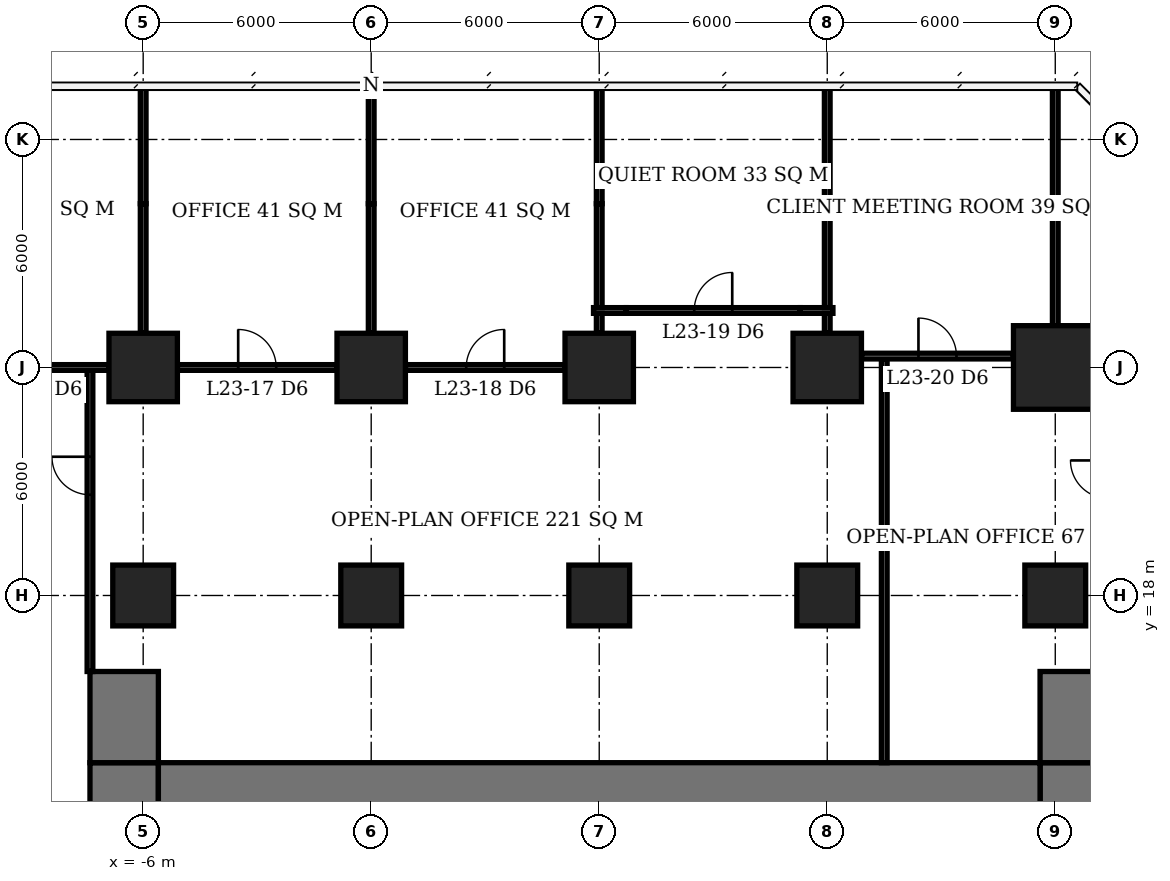
"""IFC4 building model, lengths in metres.
Left out: names, types, materials, properties, quantities, classifications, styles, units other than length and angle.
Written with IfcOpenShell. Run it as: python <this file> out.ifc"""

import sys

from ifc_helpers import new_model, si_unit, direction, frame, frame_2d, origin, origin_2d, place, context, subcontext, project, spatial, rectangle, extrude, element, fill, save


model = new_model("IFC4")
c1 = context("Model", 3, precision=1e-05, world=origin(), true_north=direction((0.0, 1.0)))
c2 = subcontext(c1, "Body", "Model", "MODEL_VIEW")
j1 = project(units=[si_unit("LENGTHUNIT", "METRE"), si_unit("PLANEANGLEUNIT", "RADIAN")], contexts=[c1])
p1 = place(None, origin())
s1 = spatial("IfcSite", under=j1, at=p1, CompositionType="ELEMENT")
p2 = place(p1, origin())
s2 = spatial("IfcBuilding", under=s1, at=p2, CompositionType="ELEMENT")
p3 = place(p2, frame((0.0, 0.0, 97.7)))
s3 = spatial("IfcBuildingStorey", under=s2, at=p3, CompositionType="ELEMENT", Elevation=97.7)
p4 = place(p3, frame((-6.0, 18.0, 0.0), z_axis=(0.0, 0.0, 1.0), x_axis=(1.0, 0.0, 0.0)))
e1 = element("IfcColumn", 1, at=p4, inside=s3, PredefinedType="COLUMN", context=c2, shape_type="SweptSolid", body=[
    extrude(rectangle(XDim=1.6, YDim=1.6, at=origin_2d()), origin(), (0.0, 0.0, 1.0), 3.9),
])
p5 = place(p3, frame((-6.0, 24.0, 0.0), z_axis=(0.0, 0.0, 1.0), x_axis=(1.0, 0.0, 0.0)))
e2 = element("IfcColumn", 2, at=p5, inside=s3, PredefinedType="COLUMN", context=c2, shape_type="SweptSolid", body=[
    extrude(rectangle(XDim=1.8, YDim=1.8, at=origin_2d()), origin(), (0.0, 0.0, 1.0), 3.9),
])
p6 = place(p3, frame((0.0, 18.0, 0.0), z_axis=(0.0, 0.0, 1.0), x_axis=(1.0, 0.0, 0.0)))
e3 = element("IfcColumn", 3, at=p6, inside=s3, PredefinedType="COLUMN", context=c2, shape_type="SweptSolid", body=[
    extrude(rectangle(XDim=1.6, YDim=1.6, at=origin_2d()), origin(), (0.0, 0.0, 1.0), 3.9),
])
p7 = place(p3, frame((0.0, 24.0, 0.0), z_axis=(0.0, 0.0, 1.0), x_axis=(1.0, 0.0, 0.0)))
e4 = element("IfcColumn", 4, at=p7, inside=s3, PredefinedType="COLUMN", context=c2, shape_type="SweptSolid", body=[
    extrude(rectangle(XDim=1.8, YDim=1.8, at=origin_2d()), origin(), (0.0, 0.0, 1.0), 3.9),
])
p8 = place(p3, frame((6.0, 18.0, 0.0), z_axis=(0.0, 0.0, 1.0), x_axis=(1.0, 0.0, 0.0)))
e5 = element("IfcColumn", 5, at=p8, inside=s3, PredefinedType="COLUMN", context=c2, shape_type="SweptSolid", body=[
    extrude(rectangle(XDim=1.6, YDim=1.6, at=origin_2d()), origin(), (0.0, 0.0, 1.0), 3.9),
])
p9 = place(p3, frame((6.0, 24.0, 0.0), z_axis=(0.0, 0.0, 1.0), x_axis=(1.0, 0.0, 0.0)))
e6 = element("IfcColumn", 6, at=p9, inside=s3, PredefinedType="COLUMN", context=c2, shape_type="SweptSolid", body=[
    extrude(rectangle(XDim=1.8, YDim=1.8, at=origin_2d()), origin(), (0.0, 0.0, 1.0), 3.9),
])
p10 = place(p3, frame((12.0, 18.0, 0.0), z_axis=(0.0, 0.0, 1.0), x_axis=(1.0, 0.0, 0.0)))
e7 = element("IfcColumn", 7, at=p10, inside=s3, PredefinedType="COLUMN", context=c2, shape_type="SweptSolid", body=[
    extrude(rectangle(XDim=1.6, YDim=1.6, at=origin_2d()), origin(), (0.0, 0.0, 1.0), 3.9),
])
p11 = place(p3, frame((12.0, 24.0, 0.0), z_axis=(0.0, 0.0, 1.0), x_axis=(1.0, 0.0, 0.0)))
e8 = element("IfcColumn", 8, at=p11, inside=s3, PredefinedType="COLUMN", context=c2, shape_type="SweptSolid", body=[
    extrude(rectangle(XDim=1.8, YDim=1.8, at=origin_2d()), origin(), (0.0, 0.0, 1.0), 3.9),
])
p12 = place(p3, frame((18.0, 18.0, 0.0), z_axis=(0.0, 0.0, 1.0), x_axis=(1.0, 0.0, 0.0)))
e9 = element("IfcColumn", 9, at=p12, inside=s3, PredefinedType="COLUMN", context=c2, shape_type="SweptSolid", body=[
    extrude(rectangle(XDim=1.6, YDim=1.6, at=origin_2d()), origin(), (0.0, 0.0, 1.0), 3.9),
])
p13 = place(p3, frame((18.0, 24.0, 0.0), z_axis=(0.0, 0.0, 1.0), x_axis=(1.0, 0.0, 0.0)))
e10 = element("IfcColumn", 10, at=p13, inside=s3, PredefinedType="COLUMN", context=c2, shape_type="SweptSolid", body=[
    extrude(rectangle(XDim=2.2, YDim=2.2, at=origin_2d()), origin(), (0.0, 0.0, 1.0), 3.9),
])
p14 = place(p3, frame((-5.6, 12.6, 0.0), z_axis=(0.0, 0.0, 1.0), x_axis=(1.0, 0.0, 0.0)))
e11 = element("IfcWall", 11, at=p14, inside=s3, PredefinedType="SHEAR", context=c2, shape_type="SweptSolid", body=[
    extrude(rectangle(XDim=23.2, YDim=2.0, at=frame_2d((11.6, 0.0))), origin(), (0.0, 0.0, 1.0), 3.9),
])
p15 = place(p3, frame((-6.5, -7.6, 0.0), z_axis=(0.0, 0.0, 1.0), x_axis=(0.0, 1.0, 0.0)))
e12 = element("IfcWall", 12, at=p15, inside=s3, PredefinedType="SHEAR", context=c2, shape_type="SweptSolid", body=[
    extrude(rectangle(XDim=21.2, YDim=1.8, at=frame_2d((10.6, 0.0))), origin(), (0.0, 0.0, 1.0), 3.9),
])
p16 = place(p15, frame((7.8, 0.0, 0.0)))
e13 = element("IfcOpeningElement", 13, at=p16, cuts=e12, PredefinedType="OPENING", context=c2, shape_type="SweptSolid", body=[
    extrude(rectangle(XDim=1.8, YDim=2.4, at=frame_2d((0.9, 1.2))), frame((0.0, 0.91, 0.0), z_axis=(0.0, -1.0, 0.0), x_axis=(1.0, 0.0, 0.0)), (0.0, 0.0, 1.0), 1.82),
])
p17 = place(p3, frame((18.5, -7.6, 0.0), z_axis=(0.0, 0.0, 1.0), x_axis=(0.0, 1.0, 0.0)))
e14 = element("IfcWall", 14, at=p17, inside=s3, PredefinedType="SHEAR", context=c2, shape_type="SweptSolid", body=[
    extrude(rectangle(XDim=21.2, YDim=1.8, at=frame_2d((10.6, 0.0))), origin(), (0.0, 0.0, 1.0), 3.9),
])
p18 = place(p17, frame((9.2, 0.0, 0.0)))
e15 = element("IfcOpeningElement", 15, at=p18, cuts=e14, PredefinedType="OPENING", context=c2, shape_type="SweptSolid", body=[
    extrude(rectangle(XDim=1.8, YDim=2.4, at=frame_2d((0.9, 1.2))), frame((0.0, 0.91, 0.0), z_axis=(0.0, -1.0, 0.0), x_axis=(1.0, 0.0, 0.0)), (0.0, 0.0, 1.0), 1.82),
])
for number, where, z_axis, x_axis in (
    (16, (-6.5, 13.6, 0.0), (0.0, 0.0, 1.0), (0.0, 1.0, 0.0)),
    (17, (18.5, 13.6, 0.0), (0.0, 0.0, 1.0), (0.0, 1.0, 0.0)),
):
    element("IfcWall", number, at=place(p3, frame(where, z_axis=z_axis, x_axis=x_axis)), inside=s3, PredefinedType="SHEAR", context=c2, shape_type="SweptSolid", body=[
        extrude(rectangle(XDim=2.4, YDim=1.8, at=frame_2d((1.2, 0.0))), origin(), (0.0, 0.0, 1.0), 3.9),
    ])
p19 = place(p3, frame((-11.0, 24.0, 0.0), z_axis=(0.0, 0.0, 1.0), x_axis=(1.0, 0.0, 0.0)))
e18 = element("IfcWall", 18, at=p19, inside=s3, PredefinedType="PARTITIONING", context=c2, shape_type="SweptSolid", body=[
    extrude(rectangle(XDim=4.1, YDim=0.15, at=frame_2d((2.05, 0.0))), origin(), (0.0, 0.0, 1.0), 3.65),
])
p20 = place(p19, frame((1.55, 0.0, 0.0)))
e19 = element("IfcOpeningElement", 19, at=p20, cuts=e18, PredefinedType="OPENING", context=c2, shape_type="SweptSolid", body=[
    extrude(rectangle(XDim=1.0, YDim=2.1, at=frame_2d((0.5, 1.05))), frame((0.0, 0.085, 0.0), z_axis=(0.0, -1.0, 0.0), x_axis=(1.0, 0.0, 0.0)), (0.0, 0.0, 1.0), 0.17),
])
p21 = place(p3, frame((-5.1, 24.0, 0.0), z_axis=(0.0, 0.0, 1.0), x_axis=(1.0, 0.0, 0.0)))
e20 = element("IfcWall", 20, at=p21, inside=s3, PredefinedType="PARTITIONING", context=c2, shape_type="SweptSolid", body=[
    extrude(rectangle(XDim=4.2, YDim=0.15, at=frame_2d((2.1, 0.0))), origin(), (0.0, 0.0, 1.0), 3.65),
])
p22 = place(p21, frame((1.6, 0.0, 0.0)))
e21 = element("IfcOpeningElement", 21, at=p22, cuts=e20, PredefinedType="OPENING", context=c2, shape_type="SweptSolid", body=[
    extrude(rectangle(XDim=1.0, YDim=2.1, at=frame_2d((0.5, 1.05))), frame((0.0, 0.085, 0.0), z_axis=(0.0, -1.0, 0.0), x_axis=(1.0, 0.0, 0.0)), (0.0, 0.0, 1.0), 0.17),
])
p23 = place(p3, frame((0.9, 24.0, 0.0), z_axis=(0.0, 0.0, 1.0), x_axis=(1.0, 0.0, 0.0)))
e22 = element("IfcWall", 22, at=p23, inside=s3, PredefinedType="PARTITIONING", context=c2, shape_type="SweptSolid", body=[
    extrude(rectangle(XDim=4.2, YDim=0.15, at=frame_2d((2.1, 0.0))), origin(), (0.0, 0.0, 1.0), 3.65),
])
p24 = place(p23, frame((1.6, 0.0, 0.0)))
e23 = element("IfcOpeningElement", 23, at=p24, cuts=e22, PredefinedType="OPENING", context=c2, shape_type="SweptSolid", body=[
    extrude(rectangle(XDim=1.0, YDim=2.1, at=frame_2d((0.5, 1.05))), frame((0.0, 0.085, 0.0), z_axis=(0.0, -1.0, 0.0), x_axis=(1.0, 0.0, 0.0)), (0.0, 0.0, 1.0), 0.17),
])
p25 = place(p3, frame((12.9, 24.3, 0.0), z_axis=(0.0, 0.0, 1.0), x_axis=(1.0, 0.0, 0.0)))
e24 = element("IfcWall", 24, at=p25, inside=s3, PredefinedType="PARTITIONING", context=c2, shape_type="SweptSolid", body=[
    extrude(rectangle(XDim=4.0, YDim=0.15, at=frame_2d((2.0, 0.0))), origin(), (0.0, 0.0, 1.0), 3.65),
])
p26 = place(p25, frame((1.5, 0.0, 0.0)))
e25 = element("IfcOpeningElement", 25, at=p26, cuts=e24, PredefinedType="OPENING", context=c2, shape_type="SweptSolid", body=[
    extrude(rectangle(XDim=1.0, YDim=2.1, at=frame_2d((0.5, 1.05))), frame((0.0, 0.085, 0.0), z_axis=(0.0, -1.0, 0.0), x_axis=(1.0, 0.0, 0.0)), (0.0, 0.0, 1.0), 0.17),
])
p27 = place(p3, frame((5.85, 25.5, 0.0), z_axis=(0.0, 0.0, 1.0), x_axis=(1.0, 0.0, 0.0)))
e26 = element("IfcWall", 26, at=p27, inside=s3, PredefinedType="PARTITIONING", context=c2, shape_type="SweptSolid", body=[
    extrude(rectangle(XDim=0.86, YDim=0.15, at=frame_2d((0.43, 0.0))), origin(), (0.0, 0.0, 1.0), 2.65),
])
p28 = place(p3, frame((6.71, 25.5, 0.0), z_axis=(0.0, 0.0, 1.0), x_axis=(1.0, 0.0, 0.0)))
e27 = element("IfcWall", 27, at=p28, inside=s3, PredefinedType="PARTITIONING", context=c2, shape_type="SweptSolid", body=[
    extrude(rectangle(XDim=4.58, YDim=0.15, at=frame_2d((2.29, 0.0))), origin(), (0.0, 0.0, 1.0), 3.65),
])
p29 = place(p28, frame((1.79, 0.0, 0.0)))
e28 = element("IfcOpeningElement", 28, at=p29, cuts=e27, PredefinedType="OPENING", context=c2, shape_type="SweptSolid", body=[
    extrude(rectangle(XDim=1.0, YDim=2.1, at=frame_2d((0.5, 1.05))), frame((0.0, 0.085, 0.0), z_axis=(0.0, -1.0, 0.0), x_axis=(1.0, 0.0, 0.0)), (0.0, 0.0, 1.0), 0.17),
])
p30 = place(p3, frame((11.29, 25.5, 0.0), z_axis=(0.0, 0.0, 1.0), x_axis=(1.0, 0.0, 0.0)))
e29 = element("IfcWall", 29, at=p30, inside=s3, PredefinedType="PARTITIONING", context=c2, shape_type="SweptSolid", body=[
    extrude(rectangle(XDim=0.86, YDim=0.15, at=frame_2d((0.43, 0.0))), origin(), (0.0, 0.0, 1.0), 2.65),
])
p31 = place(p3, frame((-6.0, 24.9, 0.0), z_axis=(0.0, 0.0, 1.0), x_axis=(0.0, 1.0, 0.0)))
e30 = element("IfcWall", 30, at=p31, inside=s3, PredefinedType="PARTITIONING", context=c2, shape_type="SweptSolid", body=[
    extrude(rectangle(XDim=3.41, YDim=0.15, at=frame_2d((1.705, 0.0))), origin(), (0.0, 0.0, 1.0), 2.65),
])
p32 = place(p3, frame((-6.0, 28.31, 0.0), z_axis=(0.0, 0.0, 1.0), x_axis=(0.0, 1.0, 0.0)))
e31 = element("IfcWall", 31, at=p32, inside=s3, PredefinedType="PARTITIONING", context=c2, shape_type="SweptSolid", body=[
    extrude(rectangle(XDim=3.09, YDim=0.15, at=frame_2d((1.545, 0.0))), origin(), (0.0, 0.0, 1.0), 3.65),
])
p33 = place(p3, frame((0.0, 24.9, 0.0), z_axis=(0.0, 0.0, 1.0), x_axis=(0.0, 1.0, 0.0)))
e32 = element("IfcWall", 32, at=p33, inside=s3, PredefinedType="PARTITIONING", context=c2, shape_type="SweptSolid", body=[
    extrude(rectangle(XDim=3.41, YDim=0.15, at=frame_2d((1.705, 0.0))), origin(), (0.0, 0.0, 1.0), 2.65),
])
p34 = place(p3, frame((0.0, 28.31, 0.0), z_axis=(0.0, 0.0, 1.0), x_axis=(0.0, 1.0, 0.0)))
e33 = element("IfcWall", 33, at=p34, inside=s3, PredefinedType="PARTITIONING", context=c2, shape_type="SweptSolid", body=[
    extrude(rectangle(XDim=3.04, YDim=0.15, at=frame_2d((1.52, 0.0))), origin(), (0.0, 0.0, 1.0), 3.65),
])
p35 = place(p3, frame((6.0, 24.9, 0.0), z_axis=(0.0, 0.0, 1.0), x_axis=(0.0, 1.0, 0.0)))
e34 = element("IfcWall", 34, at=p35, inside=s3, PredefinedType="PARTITIONING", context=c2, shape_type="SweptSolid", body=[
    extrude(rectangle(XDim=0.525, YDim=0.15, at=frame_2d((0.263, 0.0))), origin(), (0.0, 0.0, 1.0), 2.65),
])
p36 = place(p3, frame((6.0, 25.575, 0.0), z_axis=(0.0, 0.0, 1.0), x_axis=(0.0, 1.0, 0.0)))
e35 = element("IfcWall", 35, at=p36, inside=s3, PredefinedType="PARTITIONING", context=c2, shape_type="SweptSolid", body=[
    extrude(rectangle(XDim=2.735, YDim=0.15, at=frame_2d((1.368, 0.0))), origin(), (0.0, 0.0, 1.0), 2.65),
])
p37 = place(p3, frame((6.0, 28.31, 0.0), z_axis=(0.0, 0.0, 1.0), x_axis=(0.0, 1.0, 0.0)))
e36 = element("IfcWall", 36, at=p37, inside=s3, PredefinedType="PARTITIONING", context=c2, shape_type="SweptSolid", body=[
    extrude(rectangle(XDim=3.09, YDim=0.15, at=frame_2d((1.545, 0.0))), origin(), (0.0, 0.0, 1.0), 3.65),
])
p38 = place(p3, frame((12.0, 24.9, 0.0), z_axis=(0.0, 0.0, 1.0), x_axis=(0.0, 1.0, 0.0)))
e37 = element("IfcWall", 37, at=p38, inside=s3, PredefinedType="PARTITIONING", context=c2, shape_type="SweptSolid", body=[
    extrude(rectangle(XDim=0.525, YDim=0.15, at=frame_2d((0.263, 0.0))), origin(), (0.0, 0.0, 1.0), 2.65),
])
p39 = place(p3, frame((12.0, 25.575, 0.0), z_axis=(0.0, 0.0, 1.0), x_axis=(0.0, 1.0, 0.0)))
e38 = element("IfcWall", 38, at=p39, inside=s3, PredefinedType="PARTITIONING", context=c2, shape_type="SweptSolid", body=[
    extrude(rectangle(XDim=2.735, YDim=0.15, at=frame_2d((1.368, 0.0))), origin(), (0.0, 0.0, 1.0), 2.65),
])
p40 = place(p3, frame((12.0, 28.31, 0.0), z_axis=(0.0, 0.0, 1.0), x_axis=(0.0, 1.0, 0.0)))
e39 = element("IfcWall", 39, at=p40, inside=s3, PredefinedType="PARTITIONING", context=c2, shape_type="SweptSolid", body=[
    extrude(rectangle(XDim=3.09, YDim=0.15, at=frame_2d((1.545, 0.0))), origin(), (0.0, 0.0, 1.0), 3.65),
])
p41 = place(p3, frame((18.0, 25.1, 0.0), z_axis=(0.0, 0.0, 1.0), x_axis=(0.0, 1.0, 0.0)))
e40 = element("IfcWall", 40, at=p41, inside=s3, PredefinedType="PARTITIONING", context=c2, shape_type="SweptSolid", body=[
    extrude(rectangle(XDim=3.21, YDim=0.15, at=frame_2d((1.605, 0.0))), origin(), (0.0, 0.0, 1.0), 2.65),
])
p42 = place(p3, frame((18.0, 28.31, 0.0), z_axis=(0.0, 0.0, 1.0), x_axis=(0.0, 1.0, 0.0)))
e41 = element("IfcWall", 41, at=p42, inside=s3, PredefinedType="PARTITIONING", context=c2, shape_type="SweptSolid", body=[
    extrude(rectangle(XDim=3.09, YDim=0.15, at=frame_2d((1.545, 0.0))), origin(), (0.0, 0.0, 1.0), 3.65),
])
p43 = place(p3, frame((-7.4, 16.0, 0.0), z_axis=(0.0, 0.0, 1.0), x_axis=(0.0, 1.0, 0.0)))
e42 = element("IfcWall", 42, at=p43, inside=s3, PredefinedType="PARTITIONING", context=c2, shape_type="SweptSolid", body=[
    extrude(rectangle(XDim=7.925, YDim=0.15, at=frame_2d((3.962, 0.0))), origin(), (0.0, 0.0, 1.0), 3.65),
])
p44 = place(p43, frame((4.651, 0.0, 0.0)))
e43 = element("IfcOpeningElement", 43, at=p44, cuts=e42, PredefinedType="OPENING", context=c2, shape_type="SweptSolid", body=[
    extrude(rectangle(XDim=1.0, YDim=2.1, at=frame_2d((0.5, 1.05))), frame((0.0, 0.085, 0.0), z_axis=(0.0, -1.0, 0.0), x_axis=(1.0, 0.0, 0.0)), (0.0, 0.0, 1.0), 0.17),
])
p45 = place(p3, frame((13.5, 13.6, 0.0), z_axis=(0.0, 0.0, 1.0), x_axis=(0.0, 1.0, 0.0)))
e44 = element("IfcWall", 44, at=p45, inside=s3, PredefinedType="PARTITIONING", context=c2, shape_type="SweptSolid", body=[
    extrude(rectangle(XDim=10.625, YDim=0.15, at=frame_2d((5.312, 0.0))), origin(), (0.0, 0.0, 1.0), 3.65),
])
p46 = place(p22, origin())
e45 = element("IfcDoor", 45, at=p46, inside=s3, OperationType="SINGLE_SWING_LEFT", PredefinedType="DOOR", context=c2, shape_type="SweptSolid", body=[
    extrude(rectangle(XDim=1.0, YDim=2.1, at=frame_2d((0.5, 1.05))), frame((0.0, 0.025, 0.0), z_axis=(0.0, -1.0, 0.0), x_axis=(1.0, 0.0, 0.0)), (0.0, 0.0, 1.0), 0.05),
])
fill(e21, e45)
p47 = place(p24, origin())
e46 = element("IfcDoor", 46, at=p47, inside=s3, OperationType="SINGLE_SWING_RIGHT", PredefinedType="DOOR", context=c2, shape_type="SweptSolid", body=[
    extrude(rectangle(XDim=1.0, YDim=2.1, at=frame_2d((0.5, 1.05))), frame((0.0, 0.025, 0.0), z_axis=(0.0, -1.0, 0.0), x_axis=(1.0, 0.0, 0.0)), (0.0, 0.0, 1.0), 0.05),
])
fill(e23, e46)
p48 = place(p29, origin())
e47 = element("IfcDoor", 47, at=p48, inside=s3, OperationType="SINGLE_SWING_RIGHT", PredefinedType="DOOR", context=c2, shape_type="SweptSolid", body=[
    extrude(rectangle(XDim=1.0, YDim=2.1, at=frame_2d((0.5, 1.05))), frame((0.0, 0.025, 0.0), z_axis=(0.0, -1.0, 0.0), x_axis=(1.0, 0.0, 0.0)), (0.0, 0.0, 1.0), 0.05),
])
fill(e28, e47)
p49 = place(p26, origin())
e48 = element("IfcDoor", 48, at=p49, inside=s3, OperationType="SINGLE_SWING_LEFT", PredefinedType="DOOR", context=c2, shape_type="SweptSolid", body=[
    extrude(rectangle(XDim=1.0, YDim=2.1, at=frame_2d((0.5, 1.05))), frame((0.0, 0.025, 0.0), z_axis=(0.0, -1.0, 0.0), x_axis=(1.0, 0.0, 0.0)), (0.0, 0.0, 1.0), 0.05),
])
fill(e25, e48)
p50 = place(p44, origin())
e49 = element("IfcDoor", 49, at=p50, inside=s3, OperationType="SINGLE_SWING_RIGHT", PredefinedType="DOOR", context=c2, shape_type="SweptSolid", body=[
    extrude(rectangle(XDim=1.0, YDim=2.1, at=frame_2d((0.5, 1.05))), frame((0.0, 0.025, 0.0), z_axis=(0.0, -1.0, 0.0), x_axis=(1.0, 0.0, 0.0)), (0.0, 0.0, 1.0), 0.05),
])
fill(e43, e49)
save(model, sys.argv[1])
